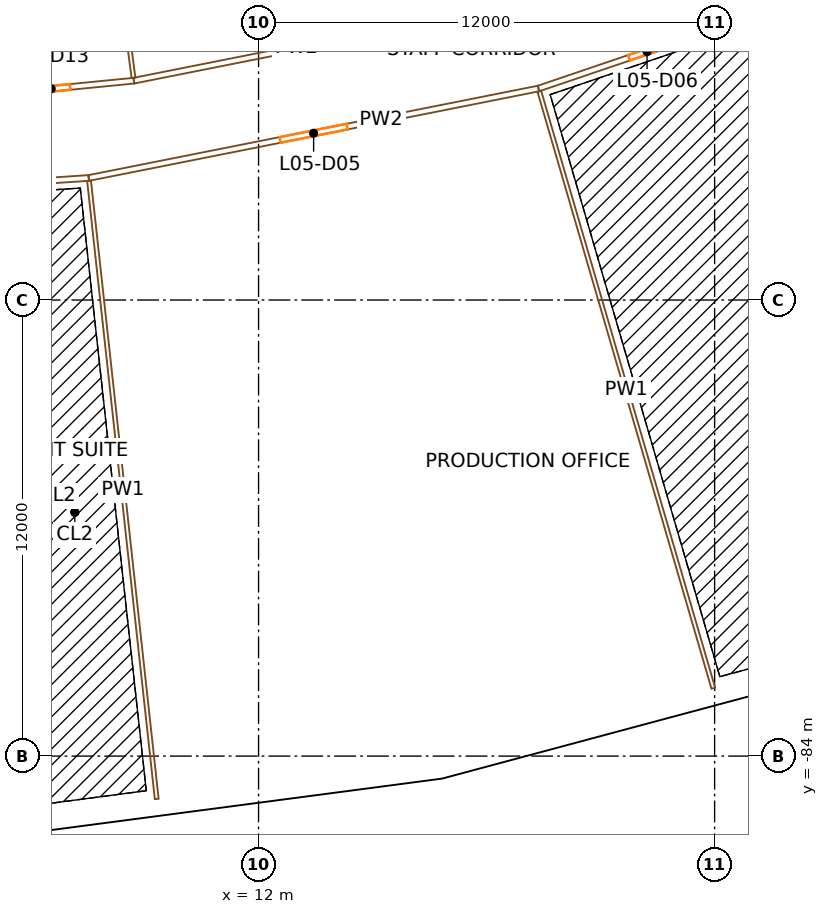
"""IFC4 building model, lengths in metres.
Left out: names, types, materials, properties, quantities, classifications, styles, units other than length and angle.
Written with IfcOpenShell. Run it as: python <this file> out.ifc"""

import sys

from ifc_helpers import new_model, si_unit, direction, frame, frame_2d, origin, origin_2d, place, context, subcontext, project, spatial, rectangle, extrude, element, fill, save


model = new_model("IFC4")
c1 = context("Model", 3, precision=1e-05, world=origin(), true_north=direction((0.0, 1.0)))
c2 = subcontext(c1, "Body", "Model", "MODEL_VIEW")
j1 = project(units=[si_unit("LENGTHUNIT", "METRE"), si_unit("PLANEANGLEUNIT", "RADIAN")], contexts=[c1])
p1 = place(None, origin())
s1 = spatial("IfcSite", under=j1, at=p1, CompositionType="ELEMENT")
p2 = place(p1, origin())
s2 = spatial("IfcBuilding", under=s1, at=p2, CompositionType="ELEMENT")
p3 = place(p2, frame((0.0, 0.0, 36.0)))
s3 = spatial("IfcBuildingStorey", under=s2, at=p3, CompositionType="ELEMENT", Elevation=36.0)
p4 = place(p3, frame((15.168, -76.256, 0.0), z_axis=(0.0, 0.0, 1.0), x_axis=(0.980785280403, 0.195090322016, 0.0)))
e1 = element("IfcColumn", 1, at=p4, inside=s3, PredefinedType="COLUMN", context=c2, shape_type="SweptSolid", body=[
    extrude(rectangle(XDim=1.4, YDim=1.8, at=origin_2d()), origin(), (0.0, 0.0, 1.0), 4.5),
])
p5 = place(p3, frame((16.631, -83.612, 0.0), z_axis=(0.0, 0.0, 1.0), x_axis=(0.980785280403, 0.195090322016, 0.0)))
e2 = element("IfcColumn", 2, at=p5, inside=s3, PredefinedType="COLUMN", context=c2, shape_type="SweptSolid", body=[
    extrude(rectangle(XDim=1.1, YDim=1.3, at=origin_2d()), origin(), (0.0, 0.0, 1.0), 4.5),
])
p6 = place(p3, frame((24.992, -73.624, 0.0), z_axis=(0.0, 0.0, 1.0), x_axis=(0.946930129495, 0.321439465303, 0.0)))
e3 = element("IfcColumn", 3, at=p6, inside=s3, PredefinedType="COLUMN", context=c2, shape_type="SweptSolid", body=[
    extrude(rectangle(XDim=1.4, YDim=1.8, at=origin_2d()), origin(), (0.0, 0.0, 1.0), 4.5),
])
p7 = place(p3, frame((5.685, -85.833, 0.0), z_axis=(0.0, 0.0, 1.0), x_axis=(0.991447502826, 0.130506126829, 0.0)))
e4 = element("IfcWall", 4, at=p7, inside=s3, PredefinedType="SOLIDWALL", context=c2, shape_type="SweptSolid", body=[
    extrude(rectangle(XDim=11.135, YDim=0.45, at=frame_2d((5.567, 0.0))), origin(), (0.0, 0.0, 1.0), 3.2),
])
p8 = place(p7, frame((3.917, 0.0, 0.9)))
e5 = element("IfcOpeningElement", 5, at=p8, cuts=e4, PredefinedType="OPENING", context=c2, shape_type="SweptSolid", body=[
    extrude(rectangle(XDim=1.2, YDim=2.15, at=frame_2d((0.6, 1.075))), frame((0.0, 0.235, 0.0), z_axis=(0.0, -1.0, 0.0), x_axis=(1.0, 0.0, 0.0)), (0.0, 0.0, 1.0), 0.47),
])
p9 = place(p7, frame((6.017, 0.0, 0.9)))
e6 = element("IfcOpeningElement", 6, at=p9, cuts=e4, PredefinedType="OPENING", context=c2, shape_type="SweptSolid", body=[
    extrude(rectangle(XDim=1.2, YDim=2.15, at=frame_2d((0.6, 1.075))), frame((0.0, 0.235, 0.0), z_axis=(0.0, -1.0, 0.0), x_axis=(1.0, 0.0, 0.0)), (0.0, 0.0, 1.0), 0.47),
])
p10 = place(p3, frame((16.754, -84.379, 0.0), z_axis=(0.0, 0.0, 1.0), x_axis=(0.965923678926, 0.258827059038, 0.0)))
e7 = element("IfcWall", 7, at=p10, inside=s3, PredefinedType="SOLIDWALL", context=c2, shape_type="SweptSolid", body=[
    extrude(rectangle(XDim=11.312, YDim=0.45, at=frame_2d((5.656, 0.0))), origin(), (0.0, 0.0, 1.0), 3.2),
])
p11 = place(p10, frame((4.006, 0.0, 0.9)))
e8 = element("IfcOpeningElement", 8, at=p11, cuts=e7, PredefinedType="OPENING", context=c2, shape_type="SweptSolid", body=[
    extrude(rectangle(XDim=1.2, YDim=2.15, at=frame_2d((0.6, 1.075))), frame((0.0, 0.235, 0.0), z_axis=(0.0, -1.0, 0.0), x_axis=(1.0, 0.0, 0.0)), (0.0, 0.0, 1.0), 0.47),
])
p12 = place(p10, frame((6.106, 0.0, 0.9)))
e9 = element("IfcOpeningElement", 9, at=p12, cuts=e7, PredefinedType="OPENING", context=c2, shape_type="SweptSolid", body=[
    extrude(rectangle(XDim=1.2, YDim=2.15, at=frame_2d((0.6, 1.075))), frame((0.0, 0.235, 0.0), z_axis=(0.0, -1.0, 0.0), x_axis=(1.0, 0.0, 0.0)), (0.0, 0.0, 1.0), 0.47),
])
p13 = place(p3, frame((7.532, -68.789, 0.0), z_axis=(0.0, 0.0, 1.0), x_axis=(-0.997856905736, -0.065433903101, 0.0)))
e10 = element("IfcWall", 10, at=p13, inside=s3, PredefinedType="PARTITIONING", context=c2, shape_type="SweptSolid", body=[
    extrude(rectangle(XDim=6.033, YDim=0.15, at=frame_2d((3.017, 0.0))), origin(), (0.0, 0.0, 1.0), 3.1),
])
p14 = place(p13, frame((2.517, 0.0, 0.0)))
e11 = element("IfcOpeningElement", 11, at=p14, cuts=e10, PredefinedType="OPENING", context=c2, shape_type="SweptSolid", body=[
    extrude(rectangle(XDim=1.0, YDim=2.1, at=frame_2d((0.5, 1.05))), frame((0.0, 0.085, 0.0), z_axis=(0.0, -1.0, 0.0), x_axis=(1.0, 0.0, 0.0)), (0.0, 0.0, 1.0), 0.17),
])
p15 = place(p3, frame((4.369, -66.657, 0.0), z_axis=(0.0, 0.0, 1.0), x_axis=(0.995184826457, 0.098016127192, 0.0)))
e12 = element("IfcWall", 12, at=p15, inside=s3, PredefinedType="PARTITIONING", context=c2, shape_type="SweptSolid", body=[
    extrude(rectangle(XDim=4.371, YDim=0.15, at=frame_2d((2.186, 0.0))), origin(), (0.0, 0.0, 1.0), 3.1),
])
p16 = place(p15, frame((1.686, 0.0, 0.0)))
e13 = element("IfcOpeningElement", 13, at=p16, cuts=e12, PredefinedType="OPENING", context=c2, shape_type="SweptSolid", body=[
    extrude(rectangle(XDim=1.0, YDim=2.1, at=frame_2d((0.5, 1.05))), frame((0.0, 0.085, 0.0), z_axis=(0.0, -1.0, 0.0), x_axis=(1.0, 0.0, 0.0)), (0.0, 0.0, 1.0), 0.17),
])
p17 = place(p3, frame((6.539, -49.665, 0.0), z_axis=(0.0, 0.0, 1.0), x_axis=(0.130530838014, -0.991444249732, 0.0)))
e14 = element("IfcWall", 14, at=p17, inside=s3, PredefinedType="PARTITIONING", context=c2, shape_type="SweptSolid", body=[
    extrude(rectangle(XDim=16.631, YDim=0.1, at=frame_2d((8.316, 0.0))), origin(), (0.0, 0.0, 1.0), 3.1),
])
p18 = place(p3, frame((19.366, -66.435, 0.0), z_axis=(0.0, 0.0, 1.0), x_axis=(-0.980784812657, -0.195092673522, 0.0)))
e15 = element("IfcWall", 15, at=p18, inside=s3, PredefinedType="PARTITIONING", context=c2, shape_type="SweptSolid", body=[
    extrude(rectangle(XDim=12.066, YDim=0.15, at=frame_2d((6.033, 0.0))), origin(), (0.0, 0.0, 1.0), 3.1),
])
p19 = place(p18, frame((5.133, 0.0, 0.0)))
e16 = element("IfcOpeningElement", 16, at=p19, cuts=e15, PredefinedType="OPENING", context=c2, shape_type="SweptSolid", body=[
    extrude(rectangle(XDim=1.8, YDim=2.1, at=frame_2d((0.9, 1.05))), frame((0.0, 0.085, 0.0), z_axis=(0.0, -1.0, 0.0), x_axis=(1.0, 0.0, 0.0)), (0.0, 0.0, 1.0), 0.17),
])
p20 = place(p3, frame((8.719, -66.229, 0.0), z_axis=(0.0, 0.0, 1.0), x_axis=(0.98078667173, 0.195083327211, 0.0)))
e17 = element("IfcWall", 17, at=p20, inside=s3, PredefinedType="PARTITIONING", context=c2, shape_type="SweptSolid", body=[
    extrude(rectangle(XDim=8.729, YDim=0.15, at=frame_2d((4.365, 0.0))), origin(), (0.0, 0.0, 1.0), 3.1),
])
p21 = place(p3, frame((9.321, -85.127, 0.0), z_axis=(0.0, 0.0, 1.0), x_axis=(-0.1088427139, 0.99405898398, 0.0)))
e18 = element("IfcWall", 18, at=p21, inside=s3, PredefinedType="PARTITIONING", context=c2, shape_type="SweptSolid", body=[
    extrude(rectangle(XDim=16.361, YDim=0.1, at=frame_2d((8.18, 0.0))), origin(), (0.0, 0.0, 1.0), 3.1),
])
p22 = place(p3, frame((25.079, -64.496, 0.0), z_axis=(0.0, 0.0, 1.0), x_axis=(-0.94693295825, -0.321431131939, 0.0)))
e19 = element("IfcWall", 19, at=p22, inside=s3, PredefinedType="PARTITIONING", context=c2, shape_type="SweptSolid", body=[
    extrude(rectangle(XDim=6.033, YDim=0.15, at=frame_2d((3.017, 0.0))), origin(), (0.0, 0.0, 1.0), 3.1),
])
p23 = place(p22, frame((2.517, 0.0, 0.0)))
e20 = element("IfcOpeningElement", 20, at=p23, cuts=e19, PredefinedType="OPENING", context=c2, shape_type="SweptSolid", body=[
    extrude(rectangle(XDim=1.0, YDim=2.1, at=frame_2d((0.5, 1.05))), frame((0.0, 0.085, 0.0), z_axis=(0.0, -1.0, 0.0), x_axis=(1.0, 0.0, 0.0)), (0.0, 0.0, 1.0), 0.17),
])
p24 = place(p3, frame((23.966, -82.214, 0.0), z_axis=(0.0, 0.0, 1.0), x_axis=(-0.279849295153, 0.960043942746, 0.0)))
e21 = element("IfcWall", 21, at=p24, inside=s3, PredefinedType="PARTITIONING", context=c2, shape_type="SweptSolid", body=[
    extrude(rectangle(XDim=16.361, YDim=0.1, at=frame_2d((8.181, 0.0))), origin(), (0.0, 0.0, 1.0), 3.1),
])
p25 = place(p8, origin())
e22 = element("IfcWindow", 22, at=p25, inside=s3, PartitioningType="SINGLE_PANEL", PredefinedType="WINDOW", context=c2, shape_type="SweptSolid", body=[
    extrude(rectangle(XDim=1.2, YDim=2.15, at=frame_2d((0.6, 1.075))), frame((0.0, 0.03, 0.0), z_axis=(0.0, -1.0, 0.0), x_axis=(1.0, 0.0, 0.0)), (0.0, 0.0, 1.0), 0.06),
])
fill(e5, e22)
p26 = place(p9, origin())
e23 = element("IfcWindow", 23, at=p26, inside=s3, PartitioningType="SINGLE_PANEL", PredefinedType="WINDOW", context=c2, shape_type="SweptSolid", body=[
    extrude(rectangle(XDim=1.2, YDim=2.15, at=frame_2d((0.6, 1.075))), frame((0.0, 0.03, 0.0), z_axis=(0.0, -1.0, 0.0), x_axis=(1.0, 0.0, 0.0)), (0.0, 0.0, 1.0), 0.06),
])
fill(e6, e23)
p27 = place(p11, origin())
e24 = element("IfcWindow", 24, at=p27, inside=s3, PartitioningType="SINGLE_PANEL", PredefinedType="WINDOW", context=c2, shape_type="SweptSolid", body=[
    extrude(rectangle(XDim=1.2, YDim=2.15, at=frame_2d((0.6, 1.075))), frame((0.0, 0.03, 0.0), z_axis=(0.0, -1.0, 0.0), x_axis=(1.0, 0.0, 0.0)), (0.0, 0.0, 1.0), 0.06),
])
fill(e8, e24)
p28 = place(p12, origin())
e25 = element("IfcWindow", 25, at=p28, inside=s3, PartitioningType="SINGLE_PANEL", PredefinedType="WINDOW", context=c2, shape_type="SweptSolid", body=[
    extrude(rectangle(XDim=1.2, YDim=2.15, at=frame_2d((0.6, 1.075))), frame((0.0, 0.03, 0.0), z_axis=(0.0, -1.0, 0.0), x_axis=(1.0, 0.0, 0.0)), (0.0, 0.0, 1.0), 0.06),
])
fill(e9, e25)
p29 = place(p19, origin())
e26 = element("IfcDoor", 26, at=p29, inside=s3, OperationType="DOUBLE_DOOR_SINGLE_SWING", PredefinedType="DOOR", context=c2, shape_type="SweptSolid", body=[
    extrude(rectangle(XDim=1.8, YDim=2.1, at=frame_2d((0.9, 1.05))), frame((0.0, 0.025, 0.0), z_axis=(0.0, -1.0, 0.0), x_axis=(1.0, 0.0, 0.0)), (0.0, 0.0, 1.0), 0.05),
])
fill(e16, e26)
p30 = place(p23, origin())
e27 = element("IfcDoor", 27, at=p30, inside=s3, OperationType="SINGLE_SWING_RIGHT", PredefinedType="DOOR", context=c2, shape_type="SweptSolid", body=[
    extrude(rectangle(XDim=1.0, YDim=2.1, at=frame_2d((0.5, 1.05))), frame((0.0, 0.025, 0.0), z_axis=(0.0, -1.0, 0.0), x_axis=(1.0, 0.0, 0.0)), (0.0, 0.0, 1.0), 0.05),
])
fill(e20, e27)
p31 = place(p16, origin())
e28 = element("IfcDoor", 28, at=p31, inside=s3, OperationType="SINGLE_SWING_RIGHT", PredefinedType="DOOR", context=c2, shape_type="SweptSolid", body=[
    extrude(rectangle(XDim=1.0, YDim=2.1, at=frame_2d((0.5, 1.05))), frame((0.0, 0.025, 0.0), z_axis=(0.0, -1.0, 0.0), x_axis=(1.0, 0.0, 0.0)), (0.0, 0.0, 1.0), 0.05),
])
fill(e13, e28)
save(model, sys.argv[1])
